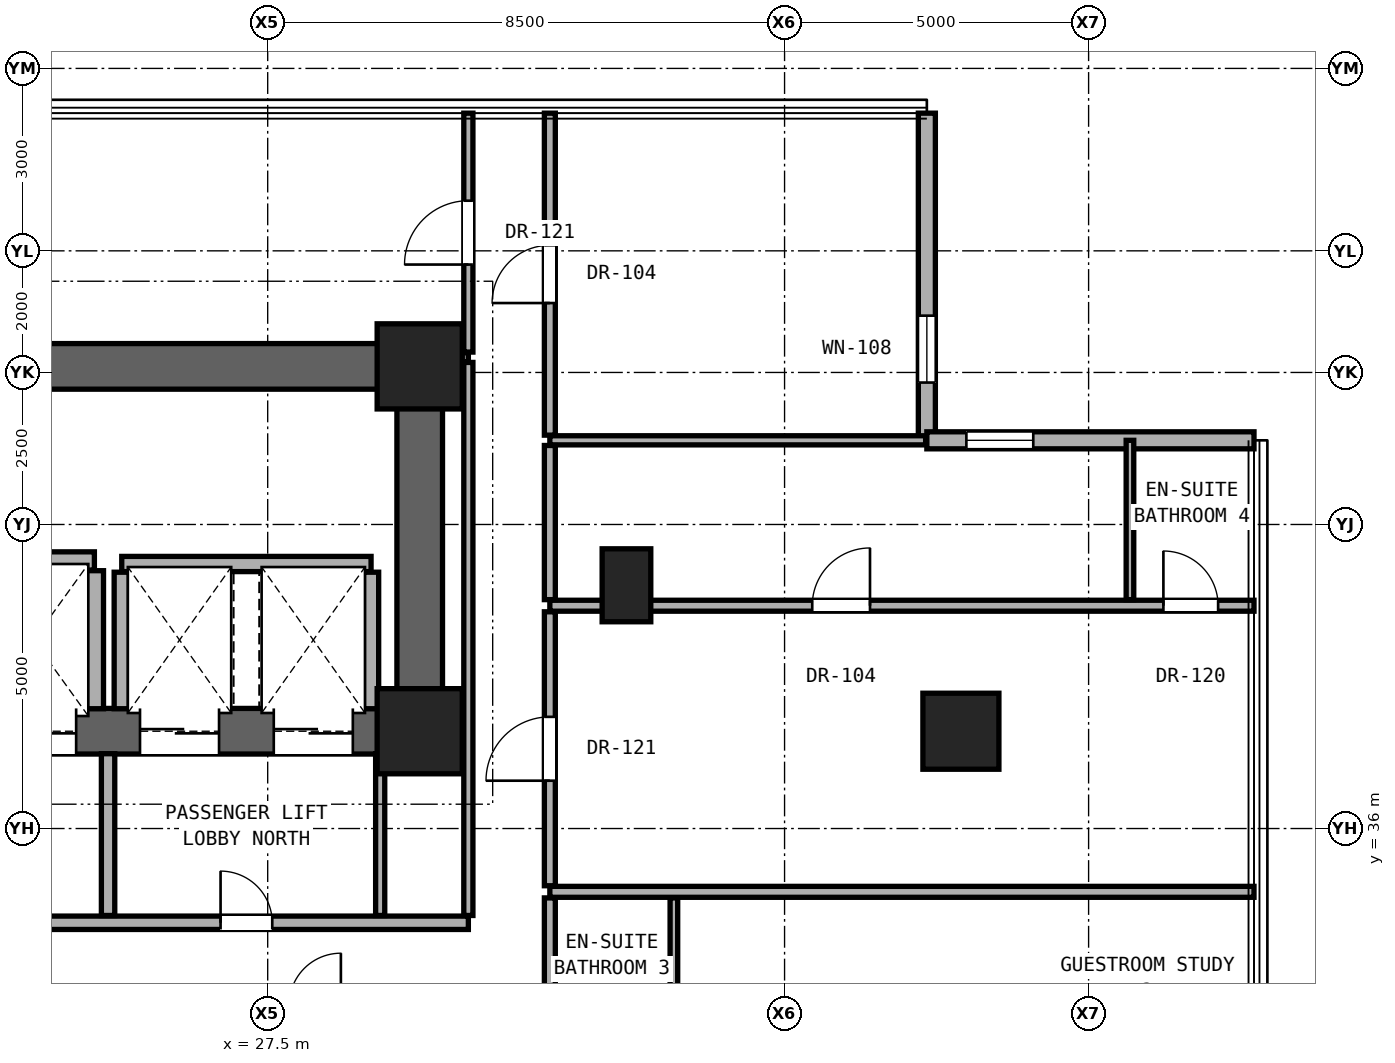
"""IFC4 building model, lengths in metres.
Left out: names, types, materials, properties, quantities, classifications, styles, units other than length and angle.
Written with IfcOpenShell. Run it as: python <this file> out.ifc"""

import sys

from ifc_helpers import new_model, si_unit, direction, frame, frame_2d, origin, origin_2d, place, context, subcontext, project, spatial, rectangle, hollow_rectangle, extrude, element, fill, save


model = new_model("IFC4")
c1 = context("Model", 3, precision=1e-05, world=origin(), true_north=direction((0.0, 1.0)))
c2 = subcontext(c1, "Body", "Model", "MODEL_VIEW")
j1 = project(units=[si_unit("LENGTHUNIT", "METRE"), si_unit("PLANEANGLEUNIT", "RADIAN")], contexts=[c1])
p1 = place(None, origin())
s1 = spatial("IfcSite", under=j1, at=p1, CompositionType="ELEMENT")
p2 = place(p1, origin())
s2 = spatial("IfcBuilding", under=s1, at=p2, CompositionType="ELEMENT")
p3 = place(p2, frame((0.0, 0.0, 48.8)))
s3 = spatial("IfcBuildingStorey", under=s2, at=p3, CompositionType="ELEMENT", Elevation=48.8)
for number, where, z_axis, x_axis in (
    (1, (30.0, 37.6, 0.0), (0.0, 0.0, 1.0), (1.0, 0.0, 0.0)),
    (2, (30.0, 43.6, 0.0), (0.0, 0.0, 1.0), (1.0, 0.0, 0.0)),
):
    element("IfcColumn", number, at=place(p3, frame(where, z_axis=z_axis, x_axis=x_axis)), inside=s3, PredefinedType="COLUMN", context=c2, shape_type="SweptSolid", body=[
        extrude(rectangle(XDim=1.4, YDim=1.4, at=origin_2d()), origin(), (0.0, 0.0, 1.0), 3.3),
    ])
p4 = place(p3, frame((38.9, 37.6, 0.0), z_axis=(0.0, 0.0, 1.0), x_axis=(1.0, 0.0, 0.0)))
e3 = element("IfcColumn", 3, at=p4, inside=s3, PredefinedType="COLUMN", context=c2, shape_type="SweptSolid", body=[
    extrude(hollow_rectangle(XDim=1.25, YDim=1.25, WallThickness=0.07, at=origin_2d()), origin(), (0.0, 0.0, 1.0), 3.3),
])
p5 = place(p3, frame((33.4, 40.0, 0.0), z_axis=(0.0, 0.0, 1.0), x_axis=(1.0, 0.0, 0.0)))
e4 = element("IfcColumn", 4, at=p5, inside=s3, PredefinedType="PILASTER", context=c2, shape_type="SweptSolid", body=[
    extrude(rectangle(XDim=0.8, YDim=1.2, at=origin_2d()), origin(), (0.0, 0.0, 1.0), 3.3),
])
p6 = place(p3, frame((11.0, 43.6, 0.0), z_axis=(0.0, 0.0, 1.0), x_axis=(1.0, 0.0, 0.0)))
e5 = element("IfcWall", 5, at=p6, inside=s3, PredefinedType="SHEAR", context=c2, shape_type="SweptSolid", body=[
    extrude(rectangle(XDim=19.0, YDim=0.75, at=frame_2d((9.5, 0.0))), origin(), (0.0, 0.0, 1.0), 3.06),
])
p7 = place(p3, frame((30.0, 37.6, 0.0), z_axis=(0.0, 0.0, 1.0), x_axis=(0.0, 1.0, 0.0)))
e6 = element("IfcWall", 6, at=p7, inside=s3, PredefinedType="SHEAR", context=c2, shape_type="SweptSolid", body=[
    extrude(rectangle(XDim=6.0, YDim=0.75, at=frame_2d((3.0, 0.0))), origin(), (0.0, 0.0, 1.0), 3.06),
])
p8 = place(p3, frame((11.0, 37.6, 0.0), z_axis=(0.0, 0.0, 1.0), x_axis=(1.0, 0.0, 0.0)))
e7 = element("IfcWall", 7, at=p8, inside=s3, PredefinedType="SHEAR", context=c2, shape_type="SweptSolid", body=[
    extrude(rectangle(XDim=19.0, YDim=0.75, at=frame_2d((9.5, 0.0))), origin(), (0.0, 0.0, 1.0), 3.06),
])
p9 = place(p8, frame((1.06, 0.0, 0.0)))
e8 = element("IfcOpeningElement", 8, at=p9, cuts=e7, PredefinedType="OPENING", context=c2, shape_type="SweptSolid", body=[
    extrude(rectangle(XDim=1.15, YDim=2.2, at=frame_2d((0.575, 1.1))), frame((0.0, 0.385, 0.0), z_axis=(0.0, -1.0, 0.0), x_axis=(1.0, 0.0, 0.0)), (0.0, 0.0, 1.0), 0.77),
])
p10 = place(p8, frame((9.55, 0.0, 0.0)))
e9 = element("IfcOpeningElement", 9, at=p10, cuts=e7, PredefinedType="OPENING", context=c2, shape_type="SweptSolid", body=[
    extrude(rectangle(XDim=1.4, YDim=2.35, at=frame_2d((0.7, 1.175))), frame((0.0, 0.385, 0.0), z_axis=(0.0, -1.0, 0.0), x_axis=(1.0, 0.0, 0.0)), (0.0, 0.0, 1.0), 0.77),
])
p11 = place(p8, frame((11.95, 0.0, 0.0)))
e10 = element("IfcOpeningElement", 10, at=p11, cuts=e7, PredefinedType="OPENING", context=c2, shape_type="SweptSolid", body=[
    extrude(rectangle(XDim=1.4, YDim=2.35, at=frame_2d((0.7, 1.175))), frame((0.0, 0.385, 0.0), z_axis=(0.0, -1.0, 0.0), x_axis=(1.0, 0.0, 0.0)), (0.0, 0.0, 1.0), 0.77),
])
p12 = place(p8, frame((14.4, 0.0, 0.0)))
e11 = element("IfcOpeningElement", 11, at=p12, cuts=e7, PredefinedType="OPENING", context=c2, shape_type="SweptSolid", body=[
    extrude(rectangle(XDim=1.3, YDim=2.3, at=frame_2d((0.65, 1.15))), frame((0.0, 0.385, 0.0), z_axis=(0.0, -1.0, 0.0), x_axis=(1.0, 0.0, 0.0)), (0.0, 0.0, 1.0), 0.77),
])
p13 = place(p8, frame((16.6, 0.0, 0.0)))
e12 = element("IfcOpeningElement", 12, at=p13, cuts=e7, PredefinedType="OPENING", context=c2, shape_type="SweptSolid", body=[
    extrude(rectangle(XDim=1.3, YDim=2.3, at=frame_2d((0.65, 1.15))), frame((0.0, 0.385, 0.0), z_axis=(0.0, -1.0, 0.0), x_axis=(1.0, 0.0, 0.0)), (0.0, 0.0, 1.0), 0.77),
])
p14 = place(p3, frame((38.34, 42.384, 0.0), z_axis=(0.0, 0.0, 1.0), x_axis=(0.0, 1.0, 0.0)))
e13 = element("IfcWall", 13, at=p14, inside=s3, PredefinedType="SOLIDWALL", context=c2, shape_type="SweptSolid", body=[
    extrude(rectangle(XDim=5.38, YDim=0.28, at=frame_2d((2.69, 0.0))), origin(), (0.0, 0.0, 1.0), 3.04),
])
p15 = place(p14, frame((0.95, 0.0, 0.85)))
e14 = element("IfcOpeningElement", 14, at=p15, cuts=e13, PredefinedType="OPENING", context=c2, shape_type="SweptSolid", body=[
    extrude(rectangle(XDim=1.1, YDim=2.0, at=frame_2d((0.55, 1.0))), frame((0.0, 0.15, 0.0), z_axis=(0.0, -1.0, 0.0), x_axis=(1.0, 0.0, 0.0)), (0.0, 0.0, 1.0), 0.3),
])
p16 = place(p3, frame((43.72, 42.384, 0.0), z_axis=(0.0, 0.0, 1.0), x_axis=(-1.0, 0.0, 0.0)))
e15 = element("IfcWall", 15, at=p16, inside=s3, PredefinedType="SOLIDWALL", context=c2, shape_type="SweptSolid", body=[
    extrude(rectangle(XDim=5.38, YDim=0.28, at=frame_2d((2.69, 0.0))), origin(), (0.0, 0.0, 1.0), 3.04),
])
p17 = place(p16, frame((3.63, 0.0, 0.85)))
e16 = element("IfcOpeningElement", 16, at=p17, cuts=e15, PredefinedType="OPENING", context=c2, shape_type="SweptSolid", body=[
    extrude(rectangle(XDim=1.1, YDim=2.0, at=frame_2d((0.55, 1.0))), frame((0.0, 0.15, 0.0), z_axis=(0.0, -1.0, 0.0), x_axis=(1.0, 0.0, 0.0)), (0.0, 0.0, 1.0), 0.3),
])
p18 = place(p3, frame((15.59, 34.45, 0.0), z_axis=(0.0, 0.0, 1.0), x_axis=(1.0, 0.0, 0.0)))
e17 = element("IfcWall", 17, at=p18, inside=s3, PredefinedType="SOLIDWALL", context=c2, shape_type="SweptSolid", body=[
    extrude(rectangle(XDim=15.21, YDim=0.22, at=frame_2d((7.605, 0.0))), origin(), (0.0, 0.0, 1.0), 2.104),
])
p19 = place(p18, frame((6.435, 0.0, 0.0)))
e18 = element("IfcOpeningElement", 18, at=p19, cuts=e17, PredefinedType="OPENING", context=c2, shape_type="SweptSolid", body=[
    extrude(rectangle(XDim=0.85, YDim=2.01, at=frame_2d((0.425, 1.005))), frame((0.0, 0.12, 0.0), z_axis=(0.0, -1.0, 0.0), x_axis=(1.0, 0.0, 0.0)), (0.0, 0.0, 1.0), 0.24),
])
p20 = place(p18, frame((11.135, 0.0, 0.0)))
e19 = element("IfcOpeningElement", 19, at=p20, cuts=e17, PredefinedType="OPENING", context=c2, shape_type="SweptSolid", body=[
    extrude(rectangle(XDim=0.85, YDim=2.01, at=frame_2d((0.425, 1.005))), frame((0.0, 0.12, 0.0), z_axis=(0.0, -1.0, 0.0), x_axis=(1.0, 0.0, 0.0)), (0.0, 0.0, 1.0), 0.24),
])
p21 = place(p18, frame((1.775, 0.0, 0.0)))
e20 = element("IfcOpeningElement", 20, at=p21, cuts=e17, PredefinedType="OPENING", context=c2, shape_type="SweptSolid", body=[
    extrude(rectangle(XDim=0.85, YDim=2.01, at=frame_2d((0.425, 1.005))), frame((0.0, 0.12, 0.0), z_axis=(0.0, -1.0, 0.0), x_axis=(1.0, 0.0, 0.0)), (0.0, 0.0, 1.0), 0.24),
])
p22 = place(p3, frame((32.14, 34.959, 0.0), z_axis=(0.0, 0.0, 1.0), x_axis=(1.0, 0.0, 0.0)))
e21 = element("IfcWall", 21, at=p22, inside=s3, PredefinedType="PARTITIONING", context=c2, shape_type="SweptSolid", body=[
    extrude(rectangle(XDim=11.58, YDim=0.18, at=frame_2d((5.79, 0.0))), origin(), (0.0, 0.0, 1.0), 2.125),
])
p23 = place(p3, frame((32.14, 39.664, 0.0), z_axis=(0.0, 0.0, 1.0), x_axis=(1.0, 0.0, 0.0)))
e22 = element("IfcWall", 22, at=p23, inside=s3, PredefinedType="PARTITIONING", context=c2, shape_type="SweptSolid", body=[
    extrude(rectangle(XDim=11.58, YDim=0.18, at=frame_2d((5.79, 0.0))), origin(), (0.0, 0.0, 1.0), 2.436),
])
p24 = place(p23, frame((4.315, 0.0, 0.0)))
e23 = element("IfcOpeningElement", 23, at=p24, cuts=e22, PredefinedType="OPENING", context=c2, shape_type="SweptSolid", body=[
    extrude(rectangle(XDim=0.95, YDim=2.15, at=frame_2d((0.475, 1.075))), frame((0.0, 0.1, 0.0), z_axis=(0.0, -1.0, 0.0), x_axis=(1.0, 0.0, 0.0)), (0.0, 0.0, 1.0), 0.2),
])
p25 = place(p23, frame((10.09, 0.0, 0.0)))
e24 = element("IfcOpeningElement", 24, at=p25, cuts=e22, PredefinedType="OPENING", context=c2, shape_type="SweptSolid", body=[
    extrude(rectangle(XDim=0.9, YDim=2.1, at=frame_2d((0.45, 1.05))), frame((0.0, 0.1, 0.0), z_axis=(0.0, -1.0, 0.0), x_axis=(1.0, 0.0, 0.0)), (0.0, 0.0, 1.0), 0.2),
])
p26 = place(p3, frame((25.1, 40.35, 0.0), z_axis=(0.0, 0.0, 1.0), x_axis=(1.0, 0.0, 0.0)))
e25 = element("IfcWall", 25, at=p26, inside=s3, PredefinedType="SOLIDWALL", context=c2, shape_type="SweptSolid", body=[
    extrude(rectangle(XDim=4.1, YDim=0.25, at=frame_2d((2.05, 0.0))), origin(), (0.0, 0.0, 1.0), 3.06),
])
p27 = place(p3, frame((20.25, 40.4, 0.0), z_axis=(0.0, 0.0, 1.0), x_axis=(1.0, 0.0, 0.0)))
e26 = element("IfcWall", 26, at=p27, inside=s3, PredefinedType="SOLIDWALL", context=c2, shape_type="SweptSolid", body=[
    extrude(rectangle(XDim=4.4, YDim=0.3, at=frame_2d((2.2, 0.0))), origin(), (0.0, 0.0, 1.0), 3.06),
])
p28 = place(p3, frame((32.14, 42.384, 0.0), z_axis=(0.0, 0.0, 1.0), x_axis=(1.0, 0.0, 0.0)))
e27 = element("IfcWall", 27, at=p28, inside=s3, PredefinedType="PARTITIONING", context=c2, shape_type="SweptSolid", body=[
    extrude(rectangle(XDim=6.18, YDim=0.15, at=frame_2d((3.09, 0.0))), origin(), (0.0, 0.0, 1.0), 3.06),
])
p29 = place(p3, frame((30.37, 43.75, 0.0), z_axis=(0.0, 0.0, 1.0), x_axis=(1.0, 0.0, 0.0)))
e28 = element("IfcWall", 28, at=p29, inside=s3, PredefinedType="PARTITIONING", context=c2, shape_type="SweptSolid", body=[
    extrude(rectangle(XDim=0.43, YDim=0.15, at=frame_2d((0.215, 0.0))), origin(), (0.0, 0.0, 1.0), 3.06),
])
p30 = place(p3, frame((24.65, 37.97, 0.0), z_axis=(0.0, 0.0, 1.0), x_axis=(0.0, 1.0, 0.0)))
e29 = element("IfcWall", 29, at=p30, inside=s3, PredefinedType="SOLIDWALL", context=c2, shape_type="SweptSolid", body=[
    extrude(rectangle(XDim=2.27, YDim=0.3, at=frame_2d((1.135, 0.0))), origin(), (0.0, 0.0, 1.0), 3.06),
])
p31 = place(p3, frame((24.875, 34.57, 0.0), z_axis=(0.0, 0.0, 1.0), x_axis=(0.0, 1.0, 0.0)))
e30 = element("IfcWall", 30, at=p31, inside=s3, PredefinedType="SOLIDWALL", context=c2, shape_type="SweptSolid", body=[
    extrude(rectangle(XDim=2.66, YDim=0.22, at=frame_2d((1.33, 0.0))), origin(), (0.0, 0.0, 1.0), 3.06),
])
p32 = place(p3, frame((25.1, 37.97, 0.0), z_axis=(0.0, 0.0, 1.0), x_axis=(0.0, 1.0, 0.0)))
e31 = element("IfcWall", 31, at=p32, inside=s3, PredefinedType="SOLIDWALL", context=c2, shape_type="SweptSolid", body=[
    extrude(rectangle(XDim=2.245, YDim=0.25, at=frame_2d((1.123, 0.0))), origin(), (0.0, 0.0, 1.0), 3.06),
])
p33 = place(p3, frame((29.35, 34.57, 0.0), z_axis=(0.0, 0.0, 1.0), x_axis=(0.0, 1.0, 0.0)))
e32 = element("IfcWall", 32, at=p33, inside=s3, PredefinedType="PARTITIONING", context=c2, shape_type="SweptSolid", body=[
    extrude(rectangle(XDim=2.66, YDim=0.15, at=frame_2d((1.33, 0.0))), origin(), (0.0, 0.0, 1.0), 3.06),
])
p34 = place(p3, frame((29.2, 37.97, 0.0), z_axis=(0.0, 0.0, 1.0), x_axis=(0.0, 1.0, 0.0)))
e33 = element("IfcWall", 33, at=p34, inside=s3, PredefinedType="SOLIDWALL", context=c2, shape_type="SweptSolid", body=[
    extrude(rectangle(XDim=2.245, YDim=0.25, at=frame_2d((1.123, 0.0))), origin(), (0.0, 0.0, 1.0), 3.06),
])
p35 = place(p3, frame((30.8, 34.57, 0.0), z_axis=(0.0, 0.0, 1.0), x_axis=(0.0, 1.0, 0.0)))
e34 = element("IfcWall", 34, at=p35, inside=s3, PredefinedType="PARTITIONING", context=c2, shape_type="SweptSolid", body=[
    extrude(rectangle(XDim=9.095, YDim=0.15, at=frame_2d((4.547, 0.0))), origin(), (0.0, 0.0, 1.0), 2.436),
])
p36 = place(p3, frame((30.8, 43.835, 0.0), z_axis=(0.0, 0.0, 1.0), x_axis=(0.0, 1.0, 0.0)))
e35 = element("IfcWall", 35, at=p36, inside=s3, PredefinedType="PARTITIONING", context=c2, shape_type="SweptSolid", body=[
    extrude(rectangle(XDim=3.929, YDim=0.15, at=frame_2d((1.964, 0.0))), origin(), (0.0, 0.0, 1.0), 3.06),
])
p37 = place(p36, frame((1.439, 0.0, 0.0)))
e36 = element("IfcOpeningElement", 36, at=p37, cuts=e35, PredefinedType="OPENING", context=c2, shape_type="SweptSolid", body=[
    extrude(rectangle(XDim=1.05, YDim=2.2, at=frame_2d((0.525, 1.1))), frame((0.0, 0.085, 0.0), z_axis=(0.0, -1.0, 0.0), x_axis=(1.0, 0.0, 0.0)), (0.0, 0.0, 1.0), 0.17),
])
p38 = place(p3, frame((32.14, 32.339, 0.0), z_axis=(0.0, 0.0, 1.0), x_axis=(0.0, 1.0, 0.0)))
e37 = element("IfcWall", 37, at=p38, inside=s3, PredefinedType="PARTITIONING", context=c2, shape_type="SweptSolid", body=[
    extrude(rectangle(XDim=2.52, YDim=0.18, at=frame_2d((1.26, 0.0))), origin(), (0.0, 0.0, 1.0), 3.06),
])
p39 = place(p3, frame((32.14, 35.059, 0.0), z_axis=(0.0, 0.0, 1.0), x_axis=(0.0, 1.0, 0.0)))
e38 = element("IfcWall", 38, at=p39, inside=s3, PredefinedType="PARTITIONING", context=c2, shape_type="SweptSolid", body=[
    extrude(rectangle(XDim=4.505, YDim=0.18, at=frame_2d((2.252, 0.0))), origin(), (0.0, 0.0, 1.0), 2.436),
])
p40 = place(p39, frame((1.728, 0.0, 0.0)))
e39 = element("IfcOpeningElement", 39, at=p40, cuts=e38, PredefinedType="OPENING", context=c2, shape_type="SweptSolid", body=[
    extrude(rectangle(XDim=1.05, YDim=2.2, at=frame_2d((0.525, 1.1))), frame((0.0, 0.1, 0.0), z_axis=(0.0, -1.0, 0.0), x_axis=(1.0, 0.0, 0.0)), (0.0, 0.0, 1.0), 0.2),
])
p41 = place(p3, frame((32.14, 39.764, 0.0), z_axis=(0.0, 0.0, 1.0), x_axis=(0.0, 1.0, 0.0)))
e40 = element("IfcWall", 40, at=p41, inside=s3, PredefinedType="PARTITIONING", context=c2, shape_type="SweptSolid", body=[
    extrude(rectangle(XDim=2.535, YDim=0.18, at=frame_2d((1.268, 0.0))), origin(), (0.0, 0.0, 1.0), 3.06),
])
p42 = place(p3, frame((32.14, 42.469, 0.0), z_axis=(0.0, 0.0, 1.0), x_axis=(0.0, 1.0, 0.0)))
e41 = element("IfcWall", 41, at=p42, inside=s3, PredefinedType="PARTITIONING", context=c2, shape_type="SweptSolid", body=[
    extrude(rectangle(XDim=5.295, YDim=0.18, at=frame_2d((2.647, 0.0))), origin(), (0.0, 0.0, 1.0), 3.06),
])
p43 = place(p42, frame((2.173, 0.0, 0.0)))
e42 = element("IfcOpeningElement", 42, at=p43, cuts=e41, PredefinedType="OPENING", context=c2, shape_type="SweptSolid", body=[
    extrude(rectangle(XDim=0.95, YDim=2.15, at=frame_2d((0.475, 1.075))), frame((0.0, 0.1, 0.0), z_axis=(0.0, -1.0, 0.0), x_axis=(1.0, 0.0, 0.0)), (0.0, 0.0, 1.0), 0.2),
])
p44 = place(p3, frame((34.18, 32.339, 0.0), z_axis=(0.0, 0.0, 1.0), x_axis=(0.0, 1.0, 0.0)))
e43 = element("IfcWall", 43, at=p44, inside=s3, PredefinedType="PARTITIONING", context=c2, shape_type="SweptSolid", body=[
    extrude(rectangle(XDim=2.52, YDim=0.125, at=frame_2d((1.26, 0.0))), origin(), (0.0, 0.0, 1.0), 3.06),
])
p45 = place(p3, frame((41.68, 39.764, 0.0), z_axis=(0.0, 0.0, 1.0), x_axis=(0.0, 1.0, 0.0)))
e44 = element("IfcWall", 44, at=p45, inside=s3, PredefinedType="PARTITIONING", context=c2, shape_type="SweptSolid", body=[
    extrude(rectangle(XDim=2.62, YDim=0.125, at=frame_2d((1.31, 0.0))), origin(), (0.0, 0.0, 1.0), 3.06),
])
p46 = place(p15, origin())
e45 = element("IfcWindow", 45, at=p46, inside=s3, PartitioningType="SINGLE_PANEL", PredefinedType="WINDOW", context=c2, shape_type="SweptSolid", body=[
    extrude(rectangle(XDim=1.1, YDim=2.0, at=frame_2d((0.55, 1.0))), frame((0.0, 0.03, 0.0), z_axis=(0.0, -1.0, 0.0), x_axis=(1.0, 0.0, 0.0)), (0.0, 0.0, 1.0), 0.06),
])
fill(e14, e45)
p47 = place(p17, origin())
e46 = element("IfcWindow", 46, at=p47, inside=s3, PartitioningType="SINGLE_PANEL", PredefinedType="WINDOW", context=c2, shape_type="SweptSolid", body=[
    extrude(rectangle(XDim=1.1, YDim=2.0, at=frame_2d((0.55, 1.0))), frame((0.0, 0.03, 0.0), z_axis=(0.0, -1.0, 0.0), x_axis=(1.0, 0.0, 0.0)), (0.0, 0.0, 1.0), 0.06),
])
fill(e16, e46)
p48 = place(p20, origin())
e47 = element("IfcDoor", 47, at=p48, inside=s3, OperationType="SINGLE_SWING_LEFT", PredefinedType="DOOR", context=c2, shape_type="SweptSolid", body=[
    extrude(rectangle(XDim=0.85, YDim=2.01, at=frame_2d((0.425, 1.005))), frame((0.0, 0.025, 0.0), z_axis=(0.0, -1.0, 0.0), x_axis=(1.0, 0.0, 0.0)), (0.0, 0.0, 1.0), 0.05),
])
fill(e19, e47)
p49 = place(p40, origin())
e48 = element("IfcDoor", 48, at=p49, inside=s3, OperationType="SINGLE_SWING_LEFT", PredefinedType="DOOR", context=c2, shape_type="SweptSolid", body=[
    extrude(rectangle(XDim=1.05, YDim=2.2, at=frame_2d((0.525, 1.1))), frame((0.0, 0.025, 0.0), z_axis=(0.0, -1.0, 0.0), x_axis=(1.0, 0.0, 0.0)), (0.0, 0.0, 1.0), 0.05),
])
fill(e39, e48)
p50 = place(p24, origin())
e49 = element("IfcDoor", 49, at=p50, inside=s3, OperationType="SINGLE_SWING_RIGHT", PredefinedType="DOOR", context=c2, shape_type="SweptSolid", body=[
    extrude(rectangle(XDim=0.95, YDim=2.15, at=frame_2d((0.475, 1.075))), frame((0.0, 0.025, 0.0), z_axis=(0.0, -1.0, 0.0), x_axis=(1.0, 0.0, 0.0)), (0.0, 0.0, 1.0), 0.05),
])
fill(e23, e49)
p51 = place(p25, origin())
e50 = element("IfcDoor", 50, at=p51, inside=s3, OperationType="SINGLE_SWING_LEFT", PredefinedType="DOOR", context=c2, shape_type="SweptSolid", body=[
    extrude(rectangle(XDim=0.9, YDim=2.1, at=frame_2d((0.45, 1.05))), frame((0.0, 0.025, 0.0), z_axis=(0.0, -1.0, 0.0), x_axis=(1.0, 0.0, 0.0)), (0.0, 0.0, 1.0), 0.05),
])
fill(e24, e50)
p52 = place(p37, origin())
e51 = element("IfcDoor", 51, at=p52, inside=s3, OperationType="SINGLE_SWING_LEFT", PredefinedType="DOOR", context=c2, shape_type="SweptSolid", body=[
    extrude(rectangle(XDim=1.05, YDim=2.2, at=frame_2d((0.525, 1.1))), frame((0.0, 0.025, 0.0), z_axis=(0.0, -1.0, 0.0), x_axis=(1.0, 0.0, 0.0)), (0.0, 0.0, 1.0), 0.05),
])
fill(e36, e51)
p53 = place(p43, origin())
e52 = element("IfcDoor", 52, at=p53, inside=s3, OperationType="SINGLE_SWING_LEFT", PredefinedType="DOOR", context=c2, shape_type="SweptSolid", body=[
    extrude(rectangle(XDim=0.95, YDim=2.15, at=frame_2d((0.475, 1.075))), frame((0.0, 0.025, 0.0), z_axis=(0.0, -1.0, 0.0), x_axis=(1.0, 0.0, 0.0)), (0.0, 0.0, 1.0), 0.05),
])
fill(e42, e52)
p54 = place(p11, origin())
e53 = element("IfcDoor", 53, at=p54, inside=s3, OperationType="DOUBLE_DOOR_SLIDING", PredefinedType="DOOR", context=c2, shape_type="SweptSolid", body=[
    extrude(rectangle(XDim=1.4, YDim=2.35, at=frame_2d((0.7, 1.175))), frame((0.0, 0.025, 0.0), z_axis=(0.0, -1.0, 0.0), x_axis=(1.0, 0.0, 0.0)), (0.0, 0.0, 1.0), 0.05),
])
fill(e10, e53)
p55 = place(p12, origin())
e54 = element("IfcDoor", 54, at=p55, inside=s3, OperationType="DOUBLE_DOOR_SLIDING", PredefinedType="DOOR", context=c2, shape_type="SweptSolid", body=[
    extrude(rectangle(XDim=1.3, YDim=2.3, at=frame_2d((0.65, 1.15))), frame((0.0, 0.025, 0.0), z_axis=(0.0, -1.0, 0.0), x_axis=(1.0, 0.0, 0.0)), (0.0, 0.0, 1.0), 0.05),
])
fill(e11, e54)
p56 = place(p13, origin())
e55 = element("IfcDoor", 55, at=p56, inside=s3, OperationType="DOUBLE_DOOR_SLIDING", PredefinedType="DOOR", context=c2, shape_type="SweptSolid", body=[
    extrude(rectangle(XDim=1.3, YDim=2.3, at=frame_2d((0.65, 1.15))), frame((0.0, 0.025, 0.0), z_axis=(0.0, -1.0, 0.0), x_axis=(1.0, 0.0, 0.0)), (0.0, 0.0, 1.0), 0.05),
])
fill(e12, e55)
save(model, sys.argv[1])
